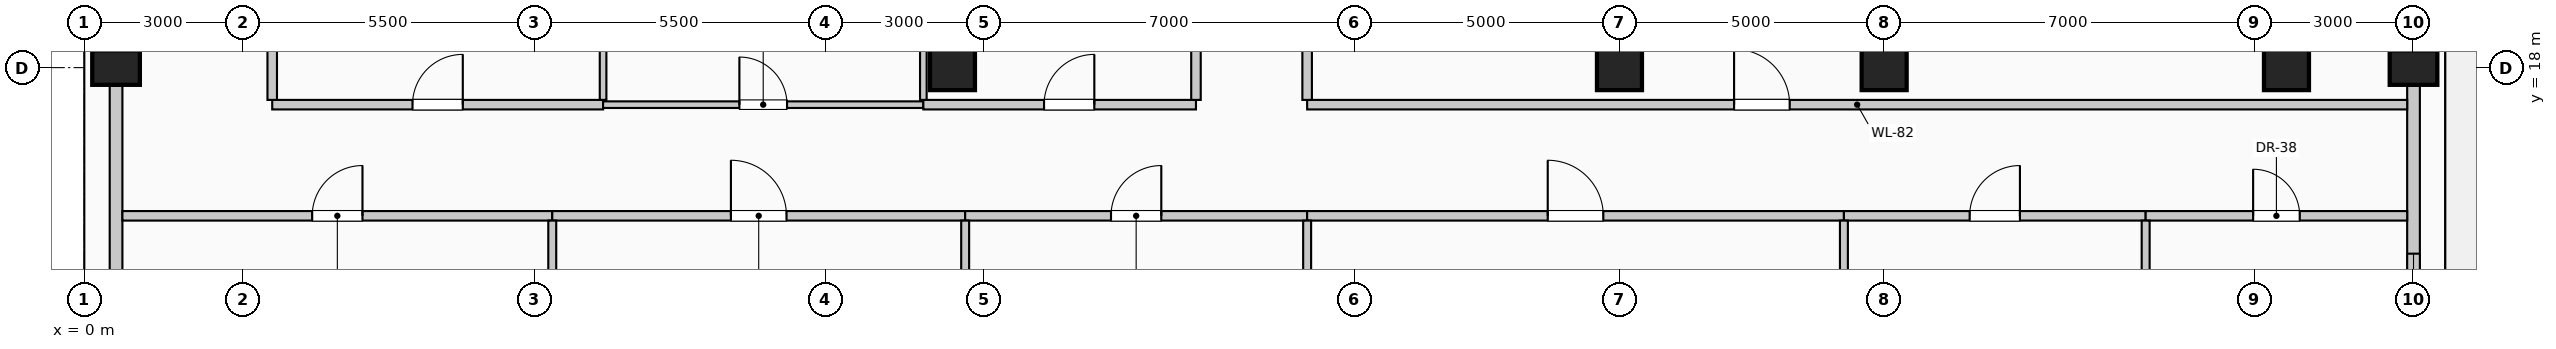
"""IFC4 building model, lengths in metres.
Left out: names, types, materials, properties, quantities, classifications, styles, units other than length and angle.
Written with IfcOpenShell. Run it as: python <this file> out.ifc"""

import sys

from ifc_helpers import new_model, si_unit, direction, frame, frame_2d, origin, origin_2d, place, context, subcontext, project, spatial, rectangle, circle, extrude, element, fill, save


model = new_model("IFC4")
c1 = context("Model", 3, precision=1e-05, world=origin(), true_north=direction((0.0, 1.0)))
c2 = subcontext(c1, "Body", "Model", "MODEL_VIEW")
j1 = project(units=[si_unit("LENGTHUNIT", "METRE"), si_unit("PLANEANGLEUNIT", "RADIAN")], contexts=[c1])
p1 = place(None, origin())
s1 = spatial("IfcSite", under=j1, at=p1, CompositionType="ELEMENT")
p2 = place(p1, origin())
s2 = spatial("IfcBuilding", under=s1, at=p2, CompositionType="ELEMENT")
p3 = place(p2, frame((0.0, 0.0, 289.0)))
s3 = spatial("IfcBuildingStorey", under=s2, at=p3, CompositionType="ELEMENT", Elevation=289.0)
for number, where, z_axis, x_axis in (
    (1, (0.6, 18.0, 0.0), (0.0, 0.0, 1.0), (0.0, 1.0, 0.0)),
    (2, (44.0, 18.0, 0.0), (0.0, 0.0, 1.0), (0.0, 1.0, 0.0)),
):
    element("IfcColumn", number, at=place(p3, frame(where, z_axis=z_axis, x_axis=x_axis)), inside=s3, PredefinedType="COLUMN", context=c2, shape_type="SweptSolid", body=[
        extrude(rectangle(XDim=0.65, YDim=0.9, at=origin_2d()), origin(), (0.0, 0.0, 1.0), 4.0),
    ])
for number, where, z_axis, x_axis in (
    (3, (16.4, 18.0, 0.0), (0.0, 0.0, 1.0), (1.0, 0.0, 0.0)),
    (4, (29.0, 18.0, 0.0), (0.0, 0.0, 1.0), (1.0, 0.0, 0.0)),
    (5, (41.6, 18.0, 0.0), (0.0, 0.0, 1.0), (1.0, 0.0, 0.0)),
    (6, (34.0, 18.0, 0.0), (0.0, 0.0, 1.0), (1.0, 0.0, 0.0)),
):
    element("IfcColumn", number, at=place(p3, frame(where, z_axis=z_axis, x_axis=x_axis)), inside=s3, PredefinedType="COLUMN", context=c2, shape_type="SweptSolid", body=[
        extrude(circle(Radius=0.425, at=origin_2d()), origin(), (0.0, 0.0, 1.0), 4.0),
    ])
p4 = place(p3, frame((0.6, 10.345, 0.0), z_axis=(0.0, 0.0, 1.0), x_axis=(0.0, 1.0, 0.0)))
e7 = element("IfcWall", 7, at=p4, inside=s3, PredefinedType="SOLIDWALL", context=c2, shape_type="SweptSolid", body=[
    extrude(rectangle(XDim=7.31, YDim=0.24, at=frame_2d((3.655, 0.0))), origin(), (0.0, 0.0, 1.0), 3.025),
])
p5 = place(p4, frame((1.037, 0.0, 0.35)))
e8 = element("IfcOpeningElement", 8, at=p5, cuts=e7, PredefinedType="OPENING", context=c2, shape_type="SweptSolid", body=[
    extrude(rectangle(XDim=2.1, YDim=2.2, at=frame_2d((1.05, 1.1))), frame((0.0, 0.13, 0.0), z_axis=(0.0, -1.0, 0.0), x_axis=(1.0, 0.0, 0.0)), (0.0, 0.0, 1.0), 0.26),
])
p6 = place(p3, frame((44.0, 17.655, 0.0), z_axis=(0.0, 0.0, 1.0), x_axis=(0.0, -1.0, 0.0)))
e9 = element("IfcWall", 9, at=p6, inside=s3, PredefinedType="SOLIDWALL", context=c2, shape_type="SweptSolid", body=[
    extrude(rectangle(XDim=13.71, YDim=0.24, at=frame_2d((6.855, 0.0))), origin(), (0.0, 0.0, 1.0), 3.025),
])
p7 = place(p6, frame((3.17, 0.0, 0.35)))
e10 = element("IfcOpeningElement", 10, at=p7, cuts=e9, PredefinedType="OPENING", context=c2, shape_type="SweptSolid", body=[
    extrude(rectangle(XDim=2.1, YDim=2.2, at=frame_2d((1.05, 1.1))), frame((0.0, 0.13, 0.0), z_axis=(0.0, -1.0, 0.0), x_axis=(1.0, 0.0, 0.0)), (0.0, 0.0, 1.0), 0.26),
])
p8 = place(p6, frame((8.44, 0.0, 0.35)))
e11 = element("IfcOpeningElement", 11, at=p8, cuts=e9, PredefinedType="OPENING", context=c2, shape_type="SweptSolid", body=[
    extrude(rectangle(XDim=2.1, YDim=2.2, at=frame_2d((1.05, 1.1))), frame((0.0, 0.13, 0.0), z_axis=(0.0, -1.0, 0.0), x_axis=(1.0, 0.0, 0.0)), (0.0, 0.0, 1.0), 0.26),
])
p9 = place(p3, frame((0.72, 15.2, 0.0), z_axis=(0.0, 0.0, 1.0), x_axis=(1.0, 0.0, 0.0)))
e12 = element("IfcWall", 12, at=p9, inside=s3, PredefinedType="PARTITIONING", context=c2, shape_type="SweptSolid", body=[
    extrude(rectangle(XDim=8.12, YDim=0.18, at=frame_2d((4.06, 0.0))), origin(), (0.0, 0.0, 1.0), 3.775),
])
p10 = place(p9, frame((3.585, 0.0, 0.0)))
e13 = element("IfcOpeningElement", 13, at=p10, cuts=e12, PredefinedType="OPENING", context=c2, shape_type="SweptSolid", body=[
    extrude(rectangle(XDim=0.95, YDim=2.15, at=frame_2d((0.475, 1.075))), frame((0.0, 0.1, 0.0), z_axis=(0.0, -1.0, 0.0), x_axis=(1.0, 0.0, 0.0)), (0.0, 0.0, 1.0), 0.2),
])
p11 = place(p3, frame((8.84, 15.2, 0.0), z_axis=(0.0, 0.0, 1.0), x_axis=(1.0, 0.0, 0.0)))
e14 = element("IfcWall", 14, at=p11, inside=s3, PredefinedType="PARTITIONING", context=c2, shape_type="SweptSolid", body=[
    extrude(rectangle(XDim=7.8, YDim=0.18, at=frame_2d((3.9, 0.0))), origin(), (0.0, 0.0, 1.0), 3.775),
])
p12 = place(p11, frame((3.375, 0.0, 0.0)))
e15 = element("IfcOpeningElement", 15, at=p12, cuts=e14, PredefinedType="OPENING", context=c2, shape_type="SweptSolid", body=[
    extrude(rectangle(XDim=1.05, YDim=2.15, at=frame_2d((0.525, 1.075))), frame((0.0, 0.1, 0.0), z_axis=(0.0, -1.0, 0.0), x_axis=(1.0, 0.0, 0.0)), (0.0, 0.0, 1.0), 0.2),
])
p13 = place(p3, frame((16.64, 15.2, 0.0), z_axis=(0.0, 0.0, 1.0), x_axis=(1.0, 0.0, 0.0)))
e16 = element("IfcWall", 16, at=p13, inside=s3, PredefinedType="PARTITIONING", context=c2, shape_type="SweptSolid", body=[
    extrude(rectangle(XDim=6.46, YDim=0.18, at=frame_2d((3.23, 0.0))), origin(), (0.0, 0.0, 1.0), 3.775),
])
p14 = place(p13, frame((2.755, 0.0, 0.0)))
e17 = element("IfcOpeningElement", 17, at=p14, cuts=e16, PredefinedType="OPENING", context=c2, shape_type="SweptSolid", body=[
    extrude(rectangle(XDim=0.95, YDim=2.15, at=frame_2d((0.475, 1.075))), frame((0.0, 0.1, 0.0), z_axis=(0.0, -1.0, 0.0), x_axis=(1.0, 0.0, 0.0)), (0.0, 0.0, 1.0), 0.2),
])
p15 = place(p3, frame((23.1, 15.2, 0.0), z_axis=(0.0, 0.0, 1.0), x_axis=(1.0, 0.0, 0.0)))
e18 = element("IfcWall", 18, at=p15, inside=s3, PredefinedType="PARTITIONING", context=c2, shape_type="SweptSolid", body=[
    extrude(rectangle(XDim=10.14, YDim=0.18, at=frame_2d((5.07, 0.0))), origin(), (0.0, 0.0, 1.0), 3.775),
])
p16 = place(p15, frame((4.545, 0.0, 0.0)))
e19 = element("IfcOpeningElement", 19, at=p16, cuts=e18, PredefinedType="OPENING", context=c2, shape_type="SweptSolid", body=[
    extrude(rectangle(XDim=1.05, YDim=2.15, at=frame_2d((0.525, 1.075))), frame((0.0, 0.1, 0.0), z_axis=(0.0, -1.0, 0.0), x_axis=(1.0, 0.0, 0.0)), (0.0, 0.0, 1.0), 0.2),
])
p17 = place(p3, frame((33.24, 15.2, 0.0), z_axis=(0.0, 0.0, 1.0), x_axis=(1.0, 0.0, 0.0)))
e20 = element("IfcWall", 20, at=p17, inside=s3, PredefinedType="PARTITIONING", context=c2, shape_type="SweptSolid", body=[
    extrude(rectangle(XDim=5.7, YDim=0.18, at=frame_2d((2.85, 0.0))), origin(), (0.0, 0.0, 1.0), 3.775),
])
p18 = place(p17, frame((2.375, 0.0, 0.0)))
e21 = element("IfcOpeningElement", 21, at=p18, cuts=e20, PredefinedType="OPENING", context=c2, shape_type="SweptSolid", body=[
    extrude(rectangle(XDim=0.95, YDim=2.15, at=frame_2d((0.475, 1.075))), frame((0.0, 0.1, 0.0), z_axis=(0.0, -1.0, 0.0), x_axis=(1.0, 0.0, 0.0)), (0.0, 0.0, 1.0), 0.2),
])
p19 = place(p3, frame((38.94, 15.2, 0.0), z_axis=(0.0, 0.0, 1.0), x_axis=(1.0, 0.0, 0.0)))
e22 = element("IfcWall", 22, at=p19, inside=s3, PredefinedType="PARTITIONING", context=c2, shape_type="SweptSolid", body=[
    extrude(rectangle(XDim=4.94, YDim=0.18, at=frame_2d((2.47, 0.0))), origin(), (0.0, 0.0, 1.0), 3.775),
])
p20 = place(p19, frame((2.03, 0.0, 0.0)))
e23 = element("IfcOpeningElement", 23, at=p20, cuts=e22, PredefinedType="OPENING", context=c2, shape_type="SweptSolid", body=[
    extrude(rectangle(XDim=0.88, YDim=2.1, at=frame_2d((0.44, 1.05))), frame((0.0, 0.1, 0.0), z_axis=(0.0, -1.0, 0.0), x_axis=(1.0, 0.0, 0.0)), (0.0, 0.0, 1.0), 0.2),
])
p21 = place(p3, frame((3.55, 17.3, 0.0), z_axis=(0.0, 0.0, 1.0), x_axis=(1.0, 0.0, 0.0)))
e24 = element("IfcWall", 24, at=p21, inside=s3, PredefinedType="PARTITIONING", context=c2, shape_type="SweptSolid", body=[
    extrude(rectangle(XDim=6.25, YDim=0.18, at=frame_2d((3.125, 0.0))), origin(), (0.0, 0.0, 1.0), 3.775),
])
p22 = place(p21, frame((2.65, 0.0, 0.0)))
e25 = element("IfcOpeningElement", 25, at=p22, cuts=e24, PredefinedType="OPENING", context=c2, shape_type="SweptSolid", body=[
    extrude(rectangle(XDim=0.95, YDim=2.15, at=frame_2d((0.475, 1.075))), frame((0.0, 0.1, 0.0), z_axis=(0.0, -1.0, 0.0), x_axis=(1.0, 0.0, 0.0)), (0.0, 0.0, 1.0), 0.2),
])
p23 = place(p3, frame((9.8, 17.3, 0.0), z_axis=(0.0, 0.0, 1.0), x_axis=(1.0, 0.0, 0.0)))
e26 = element("IfcWall", 26, at=p23, inside=s3, PredefinedType="PARTITIONING", context=c2, shape_type="SweptSolid", body=[
    extrude(rectangle(XDim=6.05, YDim=0.125, at=frame_2d((3.025, 0.0))), origin(), (0.0, 0.0, 1.0), 3.775),
])
p24 = place(p23, frame((2.575, 0.0, 0.0)))
e27 = element("IfcOpeningElement", 27, at=p24, cuts=e26, PredefinedType="OPENING", context=c2, shape_type="SweptSolid", body=[
    extrude(rectangle(XDim=0.9, YDim=2.1, at=frame_2d((0.45, 1.05))), frame((0.0, 0.073, 0.0), z_axis=(0.0, -1.0, 0.0), x_axis=(1.0, 0.0, 0.0)), (0.0, 0.0, 1.0), 0.145),
])
p25 = place(p3, frame((15.85, 17.3, 0.0), z_axis=(0.0, 0.0, 1.0), x_axis=(1.0, 0.0, 0.0)))
e28 = element("IfcWall", 28, at=p25, inside=s3, PredefinedType="PARTITIONING", context=c2, shape_type="SweptSolid", body=[
    extrude(rectangle(XDim=5.15, YDim=0.18, at=frame_2d((2.575, 0.0))), origin(), (0.0, 0.0, 1.0), 3.775),
])
p26 = place(p25, frame((2.28, 0.0, 0.0)))
e29 = element("IfcOpeningElement", 29, at=p26, cuts=e28, PredefinedType="OPENING", context=c2, shape_type="SweptSolid", body=[
    extrude(rectangle(XDim=0.95, YDim=2.15, at=frame_2d((0.475, 1.075))), frame((0.0, 0.1, 0.0), z_axis=(0.0, -1.0, 0.0), x_axis=(1.0, 0.0, 0.0)), (0.0, 0.0, 1.0), 0.2),
])
p27 = place(p3, frame((23.1, 17.3, 0.0), z_axis=(0.0, 0.0, 1.0), x_axis=(1.0, 0.0, 0.0)))
e30 = element("IfcWall", 30, at=p27, inside=s3, PredefinedType="PARTITIONING", context=c2, shape_type="SweptSolid", body=[
    extrude(rectangle(XDim=20.78, YDim=0.18, at=frame_2d((10.39, 0.0))), origin(), (0.0, 0.0, 1.0), 3.775),
])
p28 = place(p27, frame((8.065, 0.0, 0.0)))
e31 = element("IfcOpeningElement", 31, at=p28, cuts=e30, PredefinedType="OPENING", context=c2, shape_type="SweptSolid", body=[
    extrude(rectangle(XDim=1.05, YDim=2.15, at=frame_2d((0.525, 1.075))), frame((0.0, 0.1, 0.0), z_axis=(0.0, -1.0, 0.0), x_axis=(1.0, 0.0, 0.0)), (0.0, 0.0, 1.0), 0.2),
])
p29 = place(p3, frame((3.55, 17.39, 0.0), z_axis=(0.0, 0.0, 1.0), x_axis=(0.0, 1.0, 0.0)))
e32 = element("IfcWall", 32, at=p29, inside=s3, PredefinedType="PARTITIONING", context=c2, shape_type="SweptSolid", body=[
    extrude(rectangle(XDim=7.335, YDim=0.18, at=frame_2d((3.667, 0.0))), origin(), (0.0, 0.0, 1.0), 3.775),
])
p30 = place(p3, frame((8.84, 1.05, 0.0), z_axis=(0.0, 0.0, 1.0), x_axis=(0.0, 1.0, 0.0)))
e33 = element("IfcWall", 33, at=p30, inside=s3, PredefinedType="PARTITIONING", context=c2, shape_type="SweptSolid", body=[
    extrude(rectangle(XDim=14.06, YDim=0.15, at=frame_2d((7.03, 0.0))), origin(), (0.0, 0.0, 1.0), 3.775),
])
for number, where, z_axis, x_axis in (
    (34, (9.8, 17.39, 0.0), (0.0, 0.0, 1.0), (0.0, 1.0, 0.0)),
    (35, (15.85, 17.39, 0.0), (0.0, 0.0, 1.0), (0.0, 1.0, 0.0)),
):
    element("IfcWall", number, at=place(p3, frame(where, z_axis=z_axis, x_axis=x_axis)), inside=s3, PredefinedType="PARTITIONING", context=c2, shape_type="SweptSolid", body=[
        extrude(rectangle(XDim=7.335, YDim=0.125, at=frame_2d((3.667, 0.0))), origin(), (0.0, 0.0, 1.0), 3.775),
    ])
p31 = place(p3, frame((16.64, 1.05, 0.0), z_axis=(0.0, 0.0, 1.0), x_axis=(0.0, 1.0, 0.0)))
e36 = element("IfcWall", 36, at=p31, inside=s3, PredefinedType="PARTITIONING", context=c2, shape_type="SweptSolid", body=[
    extrude(rectangle(XDim=14.06, YDim=0.15, at=frame_2d((7.03, 0.0))), origin(), (0.0, 0.0, 1.0), 3.27),
])
p32 = place(p3, frame((21.0, 17.39, 0.0), z_axis=(0.0, 0.0, 1.0), x_axis=(0.0, 1.0, 0.0)))
e37 = element("IfcWall", 37, at=p32, inside=s3, PredefinedType="PARTITIONING", context=c2, shape_type="SweptSolid", body=[
    extrude(rectangle(XDim=7.335, YDim=0.18, at=frame_2d((3.667, 0.0))), origin(), (0.0, 0.0, 1.0), 3.775),
])
p33 = place(p3, frame((23.1, 0.4, 0.0), z_axis=(0.0, 0.0, 1.0), x_axis=(0.0, 1.0, 0.0)))
e38 = element("IfcWall", 38, at=p33, inside=s3, PredefinedType="PARTITIONING", context=c2, shape_type="SweptSolid", body=[
    extrude(rectangle(XDim=14.71, YDim=0.15, at=frame_2d((7.355, 0.0))), origin(), (0.0, 0.0, 1.0), 3.775),
])
p34 = place(p3, frame((23.1, 17.39, 0.0), z_axis=(0.0, 0.0, 1.0), x_axis=(0.0, 1.0, 0.0)))
e39 = element("IfcWall", 39, at=p34, inside=s3, PredefinedType="PARTITIONING", context=c2, shape_type="SweptSolid", body=[
    extrude(rectangle(XDim=10.935, YDim=0.18, at=frame_2d((5.468, 0.0))), origin(), (0.0, 0.0, 1.0), 3.775),
])
p35 = place(p3, frame((33.24, 0.4, 0.0), z_axis=(0.0, 0.0, 1.0), x_axis=(0.0, 1.0, 0.0)))
e40 = element("IfcWall", 40, at=p35, inside=s3, PredefinedType="PARTITIONING", context=c2, shape_type="SweptSolid", body=[
    extrude(rectangle(XDim=14.71, YDim=0.15, at=frame_2d((7.355, 0.0))), origin(), (0.0, 0.0, 1.0), 3.775),
])
p36 = place(p3, frame((38.94, 0.72, 0.0), z_axis=(0.0, 0.0, 1.0), x_axis=(0.0, 1.0, 0.0)))
e41 = element("IfcWall", 41, at=p36, inside=s3, PredefinedType="PARTITIONING", context=c2, shape_type="SweptSolid", body=[
    extrude(rectangle(XDim=14.39, YDim=0.15, at=frame_2d((7.195, 0.0))), origin(), (0.0, 0.0, 1.0), 3.775),
])
p37 = place(p7, origin())
e42 = element("IfcWindow", 42, at=p37, inside=s3, PartitioningType="SINGLE_PANEL", PredefinedType="WINDOW", context=c2, shape_type="SweptSolid", body=[
    extrude(rectangle(XDim=2.1, YDim=2.2, at=frame_2d((1.05, 1.1))), frame((0.0, 0.03, 0.0), z_axis=(0.0, -1.0, 0.0), x_axis=(1.0, 0.0, 0.0)), (0.0, 0.0, 1.0), 0.06),
])
fill(e10, e42)
p38 = place(p10, origin())
e43 = element("IfcDoor", 43, at=p38, inside=s3, OperationType="SINGLE_SWING_RIGHT", PredefinedType="DOOR", context=c2, shape_type="SweptSolid", body=[
    extrude(rectangle(XDim=0.95, YDim=2.15, at=frame_2d((0.475, 1.075))), frame((0.0, 0.025, 0.0), z_axis=(0.0, -1.0, 0.0), x_axis=(1.0, 0.0, 0.0)), (0.0, 0.0, 1.0), 0.05),
])
fill(e13, e43)
p39 = place(p12, origin())
e44 = element("IfcDoor", 44, at=p39, inside=s3, OperationType="SINGLE_SWING_LEFT", PredefinedType="DOOR", context=c2, shape_type="SweptSolid", body=[
    extrude(rectangle(XDim=1.05, YDim=2.15, at=frame_2d((0.525, 1.075))), frame((0.0, 0.025, 0.0), z_axis=(0.0, -1.0, 0.0), x_axis=(1.0, 0.0, 0.0)), (0.0, 0.0, 1.0), 0.05),
])
fill(e15, e44)
p40 = place(p14, origin())
e45 = element("IfcDoor", 45, at=p40, inside=s3, OperationType="SINGLE_SWING_RIGHT", PredefinedType="DOOR", context=c2, shape_type="SweptSolid", body=[
    extrude(rectangle(XDim=0.95, YDim=2.15, at=frame_2d((0.475, 1.075))), frame((0.0, 0.025, 0.0), z_axis=(0.0, -1.0, 0.0), x_axis=(1.0, 0.0, 0.0)), (0.0, 0.0, 1.0), 0.05),
])
fill(e17, e45)
p41 = place(p16, origin())
e46 = element("IfcDoor", 46, at=p41, inside=s3, OperationType="SINGLE_SWING_LEFT", PredefinedType="DOOR", context=c2, shape_type="SweptSolid", body=[
    extrude(rectangle(XDim=1.05, YDim=2.15, at=frame_2d((0.525, 1.075))), frame((0.0, 0.025, 0.0), z_axis=(0.0, -1.0, 0.0), x_axis=(1.0, 0.0, 0.0)), (0.0, 0.0, 1.0), 0.05),
])
fill(e19, e46)
p42 = place(p18, origin())
e47 = element("IfcDoor", 47, at=p42, inside=s3, OperationType="SINGLE_SWING_RIGHT", PredefinedType="DOOR", context=c2, shape_type="SweptSolid", body=[
    extrude(rectangle(XDim=0.95, YDim=2.15, at=frame_2d((0.475, 1.075))), frame((0.0, 0.025, 0.0), z_axis=(0.0, -1.0, 0.0), x_axis=(1.0, 0.0, 0.0)), (0.0, 0.0, 1.0), 0.05),
])
fill(e21, e47)
p43 = place(p20, origin())
e48 = element("IfcDoor", 48, at=p43, inside=s3, OperationType="SINGLE_SWING_LEFT", PredefinedType="DOOR", context=c2, shape_type="SweptSolid", body=[
    extrude(rectangle(XDim=0.88, YDim=2.1, at=frame_2d((0.44, 1.05))), frame((0.0, 0.025, 0.0), z_axis=(0.0, -1.0, 0.0), x_axis=(1.0, 0.0, 0.0)), (0.0, 0.0, 1.0), 0.05),
])
fill(e23, e48)
p44 = place(p22, origin())
e49 = element("IfcDoor", 49, at=p44, inside=s3, OperationType="SINGLE_SWING_RIGHT", PredefinedType="DOOR", context=c2, shape_type="SweptSolid", body=[
    extrude(rectangle(XDim=0.95, YDim=2.15, at=frame_2d((0.475, 1.075))), frame((0.0, 0.025, 0.0), z_axis=(0.0, -1.0, 0.0), x_axis=(1.0, 0.0, 0.0)), (0.0, 0.0, 1.0), 0.05),
])
fill(e25, e49)
p45 = place(p24, origin())
e50 = element("IfcDoor", 50, at=p45, inside=s3, OperationType="SINGLE_SWING_LEFT", PredefinedType="DOOR", context=c2, shape_type="SweptSolid", body=[
    extrude(rectangle(XDim=0.9, YDim=2.1, at=frame_2d((0.45, 1.05))), frame((0.0, 0.025, 0.0), z_axis=(0.0, -1.0, 0.0), x_axis=(1.0, 0.0, 0.0)), (0.0, 0.0, 1.0), 0.05),
])
fill(e27, e50)
p46 = place(p26, origin())
e51 = element("IfcDoor", 51, at=p46, inside=s3, OperationType="SINGLE_SWING_RIGHT", PredefinedType="DOOR", context=c2, shape_type="SweptSolid", body=[
    extrude(rectangle(XDim=0.95, YDim=2.15, at=frame_2d((0.475, 1.075))), frame((0.0, 0.025, 0.0), z_axis=(0.0, -1.0, 0.0), x_axis=(1.0, 0.0, 0.0)), (0.0, 0.0, 1.0), 0.05),
])
fill(e29, e51)
p47 = place(p28, origin())
e52 = element("IfcDoor", 52, at=p47, inside=s3, OperationType="SINGLE_SWING_LEFT", PredefinedType="DOOR", context=c2, shape_type="SweptSolid", body=[
    extrude(rectangle(XDim=1.05, YDim=2.15, at=frame_2d((0.525, 1.075))), frame((0.0, 0.025, 0.0), z_axis=(0.0, -1.0, 0.0), x_axis=(1.0, 0.0, 0.0)), (0.0, 0.0, 1.0), 0.05),
])
fill(e31, e52)
save(model, sys.argv[1])
